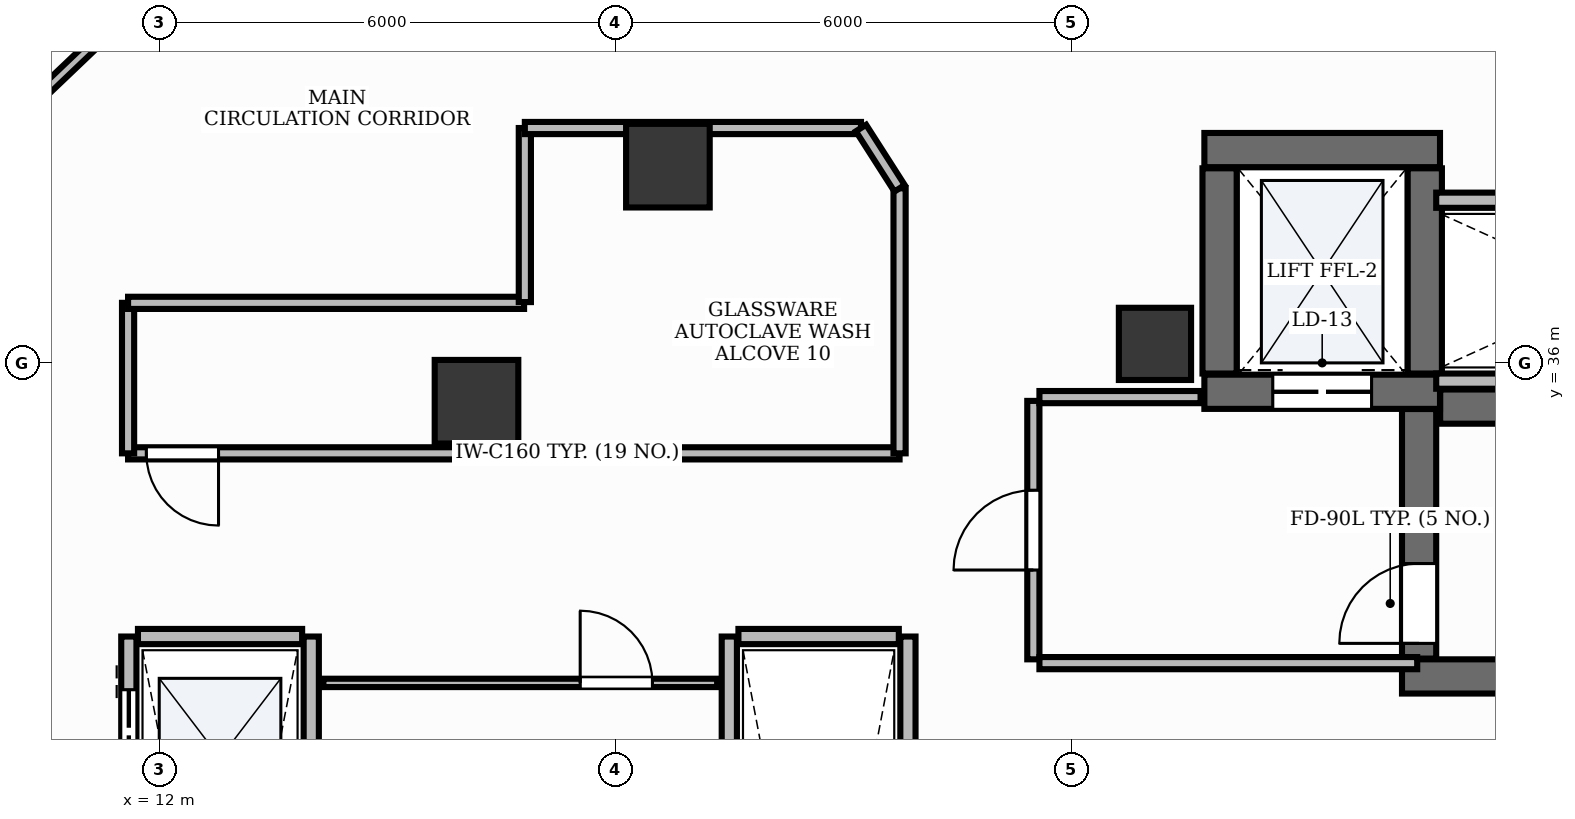
"""IFC4 building model, lengths in metres.
Left out: names, types, materials, properties, quantities, classifications, styles, units other than length and angle.
Written with IfcOpenShell. Run it as: python <this file> out.ifc"""

import sys

from ifc_helpers import new_model, si_unit, direction, frame, frame_2d, origin, origin_2d, place, context, subcontext, project, spatial, rectangle, extrude, element, fill, save


model = new_model("IFC4")
c1 = context("Model", 3, precision=1e-05, world=origin(), true_north=direction((0.0, 1.0)))
c2 = subcontext(c1, "Body", "Model", "MODEL_VIEW")
j1 = project(units=[si_unit("LENGTHUNIT", "METRE"), si_unit("PLANEANGLEUNIT", "RADIAN")], contexts=[c1])
p1 = place(None, origin())
s1 = spatial("IfcSite", under=j1, at=p1, CompositionType="ELEMENT")
p2 = place(p1, origin())
s2 = spatial("IfcBuilding", under=s1, at=p2, CompositionType="ELEMENT")
p3 = place(p2, frame((0.0, 0.0, 80.4)))
s3 = spatial("IfcBuildingStorey", under=s2, at=p3, CompositionType="ELEMENT", Elevation=80.4)
p4 = place(p3, frame((28.852, 35.425, 0.0), z_axis=(0.0, 0.0, 1.0), x_axis=(1.0, 0.0, 0.0)))
e1 = element("IfcWall", 1, at=p4, inside=s3, PredefinedType="SHEAR", context=c2, shape_type="SweptSolid", body=[
    extrude(rectangle(XDim=8.248, YDim=0.45, at=frame_2d((4.124, 0.0))), origin(), (0.0, 0.0, 1.0), 3.88),
])
p5 = place(p3, frame((28.35, 31.875, 0.0), z_axis=(0.0, 0.0, 1.0), x_axis=(1.0, 0.0, 0.0)))
e2 = element("IfcWall", 2, at=p5, inside=s3, PredefinedType="SHEAR", context=c2, shape_type="SweptSolid", body=[
    extrude(rectangle(XDim=8.75, YDim=0.45, at=frame_2d((4.375, 0.0))), origin(), (0.0, 0.0, 1.0), 3.88),
])
p6 = place(p3, frame((28.575, 32.11, 0.0), z_axis=(0.0, 0.0, 1.0), x_axis=(0.0, 1.0, 0.0)))
e3 = element("IfcWall", 3, at=p6, inside=s3, PredefinedType="SHEAR", context=c2, shape_type="SweptSolid", body=[
    extrude(rectangle(XDim=3.283, YDim=0.45, at=frame_2d((1.642, 0.0))), origin(), (0.0, 0.0, 1.0), 3.88),
])
p7 = place(p6, frame((0.2, 0.0, 0.0)))
e4 = element("IfcOpeningElement", 4, at=p7, cuts=e3, PredefinedType="OPENING", context=c2, shape_type="SweptSolid", body=[
    extrude(rectangle(XDim=1.05, YDim=2.15, at=frame_2d((0.525, 1.075))), frame((0.0, 0.24, 0.0), z_axis=(0.0, -1.0, 0.0), x_axis=(1.0, 0.0, 0.0)), (0.0, 0.0, 1.0), 0.48),
])
p8 = place(p3, frame((25.75, 38.8, 0.0), z_axis=(0.0, 0.0, 1.0), x_axis=(1.0, 0.0, 0.0)))
e5 = element("IfcWall", 5, at=p8, inside=s3, PredefinedType="SHEAR", context=c2, shape_type="SweptSolid", body=[
    extrude(rectangle(XDim=3.1, YDim=0.45, at=frame_2d((1.55, 0.0))), origin(), (0.0, 0.0, 1.0), 3.88),
])
p9 = place(p3, frame((25.75, 35.62, 0.0), z_axis=(0.0, 0.0, 1.0), x_axis=(1.0, 0.0, 0.0)))
e6 = element("IfcWall", 6, at=p9, inside=s3, PredefinedType="SHEAR", context=c2, shape_type="SweptSolid", body=[
    extrude(rectangle(XDim=3.1, YDim=0.45, at=frame_2d((1.55, 0.0))), origin(), (0.0, 0.0, 1.0), 3.88),
])
p10 = place(p9, frame((0.9, 0.0, 0.0)))
e7 = element("IfcOpeningElement", 7, at=p10, cuts=e6, PredefinedType="OPENING", context=c2, shape_type="SweptSolid", body=[
    extrude(rectangle(XDim=1.3, YDim=2.2, at=frame_2d((0.65, 1.1))), frame((0.0, 0.24, 0.0), z_axis=(0.0, -1.0, 0.0), x_axis=(1.0, 0.0, 0.0)), (0.0, 0.0, 1.0), 0.48),
])
for number, where, z_axis, x_axis in (
    (8, (25.95, 35.86, 0.0), (0.0, 0.0, 1.0), (0.0, 1.0, 0.0)),
    (9, (28.65, 35.86, 0.0), (0.0, 0.0, 1.0), (0.0, 1.0, 0.0)),
):
    element("IfcWall", number, at=place(p3, frame(where, z_axis=z_axis, x_axis=x_axis)), inside=s3, PredefinedType="SHEAR", context=c2, shape_type="SweptSolid", body=[
        extrude(rectangle(XDim=2.7, YDim=0.45, at=frame_2d((1.35, 0.0))), origin(), (0.0, 0.0, 1.0), 3.88),
    ])
p11 = place(p3, frame((25.1, 36.25, -0.0), z_axis=(0.0, 0.0, 1.0), x_axis=(1.0, 0.0, 0.0)))
e10 = element("IfcColumn", 10, at=p11, inside=s3, PredefinedType="PILASTER", context=c2, shape_type="SweptSolid", body=[
    extrude(rectangle(XDim=0.95, YDim=0.95, at=origin_2d()), origin(), (0.0, 0.0, 1.0), 3.881),
])
for number, where, z_axis, x_axis in (
    (11, (18.692, 38.595, -0.0), (0.0, 0.0, 1.0), (1.0, 0.0, 0.0)),
    (12, (16.174, 35.489, -0.0), (0.0, 0.0, 1.0), (1.0, 0.0, 0.0)),
):
    element("IfcColumn", number, at=place(p3, frame(where, z_axis=z_axis, x_axis=x_axis)), inside=s3, PredefinedType="COLUMN", context=c2, shape_type="SweptSolid", body=[
        extrude(rectangle(XDim=1.1, YDim=1.1, at=origin_2d()), origin(), (0.0, 0.0, 1.0), 3.881),
    ])
p12 = place(p3, frame((11.6, 21.6, 0.0), z_axis=(0.0, 0.0, 1.0), x_axis=(0.0, 1.0, 0.0)))
e13 = element("IfcWall", 13, at=p12, inside=s3, PredefinedType="PARTITIONING", context=c2, shape_type="SweptSolid", body=[
    extrude(rectangle(XDim=10.8, YDim=0.2, at=frame_2d((5.4, 0.0))), origin(), (0.0, 0.0, 1.0), 2.22),
])
p13 = place(p12, frame((0.9, 0.0, 0.0)))
e14 = element("IfcOpeningElement", 14, at=p13, cuts=e13, PredefinedType="OPENING", context=c2, shape_type="SweptSolid", body=[
    extrude(rectangle(XDim=1.1, YDim=2.2, at=frame_2d((0.55, 1.1))), frame((0.0, 0.115, 0.0), z_axis=(0.0, -1.0, 0.0), x_axis=(1.0, 0.0, 0.0)), (0.0, 0.0, 1.0), 0.23),
])
p14 = place(p12, frame((3.6, 0.0, 0.0)))
e15 = element("IfcOpeningElement", 15, at=p14, cuts=e13, PredefinedType="OPENING", context=c2, shape_type="SweptSolid", body=[
    extrude(rectangle(XDim=1.1, YDim=2.2, at=frame_2d((0.55, 1.1))), frame((0.0, 0.115, 0.0), z_axis=(0.0, -1.0, 0.0), x_axis=(1.0, 0.0, 0.0)), (0.0, 0.0, 1.0), 0.23),
])
p15 = place(p12, frame((6.3, 0.0, 0.0)))
e16 = element("IfcOpeningElement", 16, at=p15, cuts=e13, PredefinedType="OPENING", context=c2, shape_type="SweptSolid", body=[
    extrude(rectangle(XDim=1.1, YDim=2.2, at=frame_2d((0.55, 1.1))), frame((0.0, 0.115, 0.0), z_axis=(0.0, -1.0, 0.0), x_axis=(1.0, 0.0, 0.0)), (0.0, 0.0, 1.0), 0.23),
])
p16 = place(p12, frame((9.0, 0.0, 0.0)))
e17 = element("IfcOpeningElement", 17, at=p16, cuts=e13, PredefinedType="OPENING", context=c2, shape_type="SweptSolid", body=[
    extrude(rectangle(XDim=1.1, YDim=2.2, at=frame_2d((0.55, 1.1))), frame((0.0, 0.115, 0.0), z_axis=(0.0, -1.0, 0.0), x_axis=(1.0, 0.0, 0.0)), (0.0, 0.0, 1.0), 0.23),
])
p17 = place(p3, frame((14.0, 21.6, 0.0), z_axis=(0.0, 0.0, 1.0), x_axis=(0.0, 1.0, 0.0)))
e18 = element("IfcWall", 18, at=p17, inside=s3, PredefinedType="PARTITIONING", context=c2, shape_type="SweptSolid", body=[
    extrude(rectangle(XDim=10.8, YDim=0.2, at=frame_2d((5.4, 0.0))), origin(), (0.0, 0.0, 1.0), 2.22),
])
p18 = place(p3, frame((11.72, 32.4, 0.0), z_axis=(0.0, 0.0, 1.0), x_axis=(1.0, 0.0, 0.0)))
e19 = element("IfcWall", 19, at=p18, inside=s3, PredefinedType="PARTITIONING", context=c2, shape_type="SweptSolid", body=[
    extrude(rectangle(XDim=2.16, YDim=0.2, at=frame_2d((1.08, 0.0))), origin(), (0.0, 0.0, 1.0), 2.22),
])
for number, where, z_axis, x_axis in (
    (20, (19.5, 21.6, 0.0), (0.0, 0.0, 1.0), (0.0, 1.0, 0.0)),
    (21, (21.85, 21.6, 0.0), (0.0, 0.0, 1.0), (0.0, 1.0, 0.0)),
):
    element("IfcWall", number, at=place(p3, frame(where, z_axis=z_axis, x_axis=x_axis)), inside=s3, PredefinedType="PARTITIONING", context=c2, shape_type="SweptSolid", body=[
        extrude(rectangle(XDim=10.8, YDim=0.2, at=frame_2d((5.4, 0.0))), origin(), (0.0, 0.0, 1.0), 2.22),
    ])
p19 = place(p3, frame((19.62, 32.4, 0.0), z_axis=(0.0, 0.0, 1.0), x_axis=(1.0, 0.0, 0.0)))
e22 = element("IfcWall", 22, at=p19, inside=s3, PredefinedType="PARTITIONING", context=c2, shape_type="SweptSolid", body=[
    extrude(rectangle(XDim=2.11, YDim=0.2, at=frame_2d((1.055, 0.0))), origin(), (0.0, 0.0, 1.0), 2.22),
])
for number, where, z_axis, x_axis in (
    (23, (28.8, 35.76, 0.0), (0.0, 0.0, 1.0), (1.0, 0.0, 0.0)),
    (24, (28.8, 38.14, 0.0), (0.0, 0.0, 1.0), (1.0, 0.0, 0.0)),
):
    element("IfcWall", number, at=place(p3, frame(where, z_axis=z_axis, x_axis=x_axis)), inside=s3, PredefinedType="PARTITIONING", context=c2, shape_type="SweptSolid", body=[
        extrude(rectangle(XDim=4.57, YDim=0.2, at=frame_2d((2.285, 0.0))), origin(), (0.0, 0.0, 1.0), 2.22),
    ])
p20 = place(p3, frame((23.5, 32.1, 0.0), z_axis=(0.0, 0.0, 1.0), x_axis=(0.0, 1.0, 0.0)))
e25 = element("IfcWall", 25, at=p20, inside=s3, PredefinedType="PARTITIONING", context=c2, shape_type="SweptSolid", body=[
    extrude(rectangle(XDim=3.4, YDim=0.16, at=frame_2d((1.7, 0.0))), origin(), (0.0, 0.0, 1.0), 2.22),
])
p21 = place(p20, frame((1.175, 0.0, 0.0)))
e26 = element("IfcOpeningElement", 26, at=p21, cuts=e25, PredefinedType="OPENING", context=c2, shape_type="SweptSolid", body=[
    extrude(rectangle(XDim=1.05, YDim=2.15, at=frame_2d((0.525, 1.075))), frame((0.0, 0.095, 0.0), z_axis=(0.0, -1.0, 0.0), x_axis=(1.0, 0.0, 0.0)), (0.0, 0.0, 1.0), 0.19),
])
p22 = place(p3, frame((23.58, 32.05, 0.0), z_axis=(0.0, 0.0, 1.0), x_axis=(1.0, 0.0, 0.0)))
e27 = element("IfcWall", 27, at=p22, inside=s3, PredefinedType="PARTITIONING", context=c2, shape_type="SweptSolid", body=[
    extrude(rectangle(XDim=4.97, YDim=0.16, at=frame_2d((2.485, 0.0))), origin(), (0.0, 0.0, 1.0), 2.22),
])
p23 = place(p3, frame((23.58, 35.55, 0.0), z_axis=(0.0, 0.0, 1.0), x_axis=(1.0, 0.0, 0.0)))
e28 = element("IfcWall", 28, at=p23, inside=s3, PredefinedType="PARTITIONING", context=c2, shape_type="SweptSolid", body=[
    extrude(rectangle(XDim=2.12, YDim=0.16, at=frame_2d((1.06, 0.0))), origin(), (0.0, 0.0, 1.0), 2.22),
])
p24 = place(p3, frame((21.74, 34.81, 0.0), z_axis=(0.0, 0.0, 1.0), x_axis=(-1.0, 0.0, 0.0)))
e29 = element("IfcWall", 29, at=p24, inside=s3, PredefinedType="PARTITIONING", context=c2, shape_type="SweptSolid", body=[
    extrude(rectangle(XDim=10.15, YDim=0.16, at=frame_2d((5.075, 0.0))), origin(), (0.0, 0.0, 1.0), 2.22),
])
p25 = place(p24, frame((8.96, 0.0, 0.0)))
e30 = element("IfcOpeningElement", 30, at=p25, cuts=e29, PredefinedType="OPENING", context=c2, shape_type="SweptSolid", body=[
    extrude(rectangle(XDim=0.95, YDim=2.15, at=frame_2d((0.475, 1.075))), frame((0.0, 0.095, 0.0), z_axis=(0.0, -1.0, 0.0), x_axis=(1.0, 0.0, 0.0)), (0.0, 0.0, 1.0), 0.19),
])
p26 = place(p3, frame((14.16, 31.79, 0.0), z_axis=(0.0, 0.0, 1.0), x_axis=(1.0, 0.0, 0.0)))
e31 = element("IfcWall", 31, at=p26, inside=s3, PredefinedType="MOVABLE", context=c2, shape_type="SweptSolid", body=[
    extrude(rectangle(XDim=5.18, YDim=0.11, at=frame_2d((2.59, 0.0))), origin(), (0.0, 0.0, 1.0), 2.22),
])
p27 = place(p26, frame((3.378, 0.0, 0.0)))
e32 = element("IfcOpeningElement", 32, at=p27, cuts=e31, PredefinedType="OPENING", context=c2, shape_type="SweptSolid", body=[
    extrude(rectangle(XDim=0.95, YDim=2.15, at=frame_2d((0.475, 1.075))), frame((0.0, 0.07, 0.0), z_axis=(0.0, -1.0, 0.0), x_axis=(1.0, 0.0, 0.0)), (0.0, 0.0, 1.0), 0.14),
])
p28 = place(p3, frame((11.693, 40.727, 0.0), z_axis=(0.0, 0.0, 1.0), x_axis=(-0.72364154489, -0.69017600256, 0.0)))
e33 = element("IfcWall", 33, at=p28, inside=s3, PredefinedType="PARTITIONING", context=c2, shape_type="SweptSolid", body=[
    extrude(rectangle(XDim=1.802, YDim=0.14, at=frame_2d((0.901, 0.0))), origin(), (0.0, 0.0, 1.0), 2.22),
])
p29 = place(p3, frame((21.74, 38.297, 0.0), z_axis=(0.0, 0.0, 1.0), x_axis=(0.0, -1.0, 0.0)))
e34 = element("IfcWall", 34, at=p29, inside=s3, PredefinedType="PARTITIONING", context=c2, shape_type="SweptSolid", body=[
    extrude(rectangle(XDim=3.487, YDim=0.16, at=frame_2d((1.744, 0.0))), origin(), (0.0, 0.0, 1.0), 2.22),
])
p30 = place(p3, frame((11.59, 34.81, 0.0), z_axis=(0.0, 0.0, 1.0), x_axis=(0.0, 1.0, 0.0)))
e35 = element("IfcWall", 35, at=p30, inside=s3, PredefinedType="PARTITIONING", context=c2, shape_type="SweptSolid", body=[
    extrude(rectangle(XDim=1.98, YDim=0.16, at=frame_2d((0.99, 0.0))), origin(), (0.0, 0.0, 1.0), 2.22),
])
p31 = place(p3, frame((11.59, 36.79, 0.0), z_axis=(0.0, 0.0, 1.0), x_axis=(1.0, 0.0, 0.0)))
e36 = element("IfcWall", 36, at=p31, inside=s3, PredefinedType="PARTITIONING", context=c2, shape_type="SweptSolid", body=[
    extrude(rectangle(XDim=5.21, YDim=0.16, at=frame_2d((2.605, 0.0))), origin(), (0.0, 0.0, 1.0), 2.22),
])
p32 = place(p3, frame((16.81, 36.8, 0.0), z_axis=(0.0, 0.0, 1.0), x_axis=(0.0, 1.0, 0.0)))
e37 = element("IfcWall", 37, at=p32, inside=s3, PredefinedType="PARTITIONING", context=c2, shape_type="SweptSolid", body=[
    extrude(rectangle(XDim=2.29, YDim=0.16, at=frame_2d((1.145, 0.0))), origin(), (0.0, 0.0, 1.0), 2.22),
])
p33 = place(p3, frame((16.81, 39.09, 0.0), z_axis=(0.0, 0.0, 1.0), x_axis=(1.0, 0.0, 0.0)))
e38 = element("IfcWall", 38, at=p33, inside=s3, PredefinedType="PARTITIONING", context=c2, shape_type="SweptSolid", body=[
    extrude(rectangle(XDim=4.422, YDim=0.16, at=frame_2d((2.211, 0.0))), origin(), (0.0, 0.0, 1.0), 2.22),
])
p34 = place(p3, frame((21.232, 39.09, 0.0), z_axis=(0.0, 0.0, 1.0), x_axis=(0.539105204185, -0.842238433474, 0.0)))
e39 = element("IfcWall", 39, at=p34, inside=s3, PredefinedType="PARTITIONING", context=c2, shape_type="SweptSolid", body=[
    extrude(rectangle(XDim=0.941, YDim=0.16, at=frame_2d((0.471, 0.0))), origin(), (0.0, 0.0, 1.0), 2.22),
])
p35 = place(p7, origin())
e40 = element("IfcDoor", 40, at=p35, inside=s3, OperationType="SINGLE_SWING_LEFT", PredefinedType="DOOR", context=c2, shape_type="SweptSolid", body=[
    extrude(rectangle(XDim=1.05, YDim=2.15, at=frame_2d((0.525, 1.075))), frame((0.0, 0.025, 0.0), z_axis=(0.0, -1.0, 0.0), x_axis=(1.0, 0.0, 0.0)), (0.0, 0.0, 1.0), 0.05),
])
fill(e4, e40)
p36 = place(p16, origin())
e41 = element("IfcDoor", 41, at=p36, inside=s3, OperationType="DOUBLE_DOOR_SLIDING", PredefinedType="DOOR", context=c2, shape_type="SweptSolid", body=[
    extrude(rectangle(XDim=1.1, YDim=2.2, at=frame_2d((0.55, 1.1))), frame((0.0, 0.025, 0.0), z_axis=(0.0, -1.0, 0.0), x_axis=(1.0, 0.0, 0.0)), (0.0, 0.0, 1.0), 0.05),
])
fill(e17, e41)
p37 = place(p10, origin())
e42 = element("IfcDoor", 42, at=p37, inside=s3, OperationType="DOUBLE_DOOR_SLIDING", PredefinedType="DOOR", context=c2, shape_type="SweptSolid", body=[
    extrude(rectangle(XDim=1.3, YDim=2.2, at=frame_2d((0.65, 1.1))), frame((0.0, 0.025, 0.0), z_axis=(0.0, -1.0, 0.0), x_axis=(1.0, 0.0, 0.0)), (0.0, 0.0, 1.0), 0.05),
])
fill(e7, e42)
p38 = place(p21, origin())
e43 = element("IfcDoor", 43, at=p38, inside=s3, OperationType="SINGLE_SWING_LEFT", PredefinedType="DOOR", context=c2, shape_type="SweptSolid", body=[
    extrude(rectangle(XDim=1.05, YDim=2.15, at=frame_2d((0.525, 1.075))), frame((0.0, 0.025, 0.0), z_axis=(0.0, -1.0, 0.0), x_axis=(1.0, 0.0, 0.0)), (0.0, 0.0, 1.0), 0.05),
])
fill(e26, e43)
p39 = place(p25, origin())
e44 = element("IfcDoor", 44, at=p39, inside=s3, OperationType="SINGLE_SWING_LEFT", PredefinedType="DOOR", context=c2, shape_type="SweptSolid", body=[
    extrude(rectangle(XDim=0.95, YDim=2.15, at=frame_2d((0.475, 1.075))), frame((0.0, 0.025, 0.0), z_axis=(0.0, -1.0, 0.0), x_axis=(1.0, 0.0, 0.0)), (0.0, 0.0, 1.0), 0.05),
])
fill(e30, e44)
p40 = place(p27, origin())
e45 = element("IfcDoor", 45, at=p40, inside=s3, OperationType="SINGLE_SWING_LEFT", PredefinedType="DOOR", context=c2, shape_type="SweptSolid", body=[
    extrude(rectangle(XDim=0.95, YDim=2.15, at=frame_2d((0.475, 1.075))), frame((0.0, 0.025, 0.0), z_axis=(0.0, -1.0, 0.0), x_axis=(1.0, 0.0, 0.0)), (0.0, 0.0, 1.0), 0.05),
])
fill(e32, e45)
save(model, sys.argv[1])
